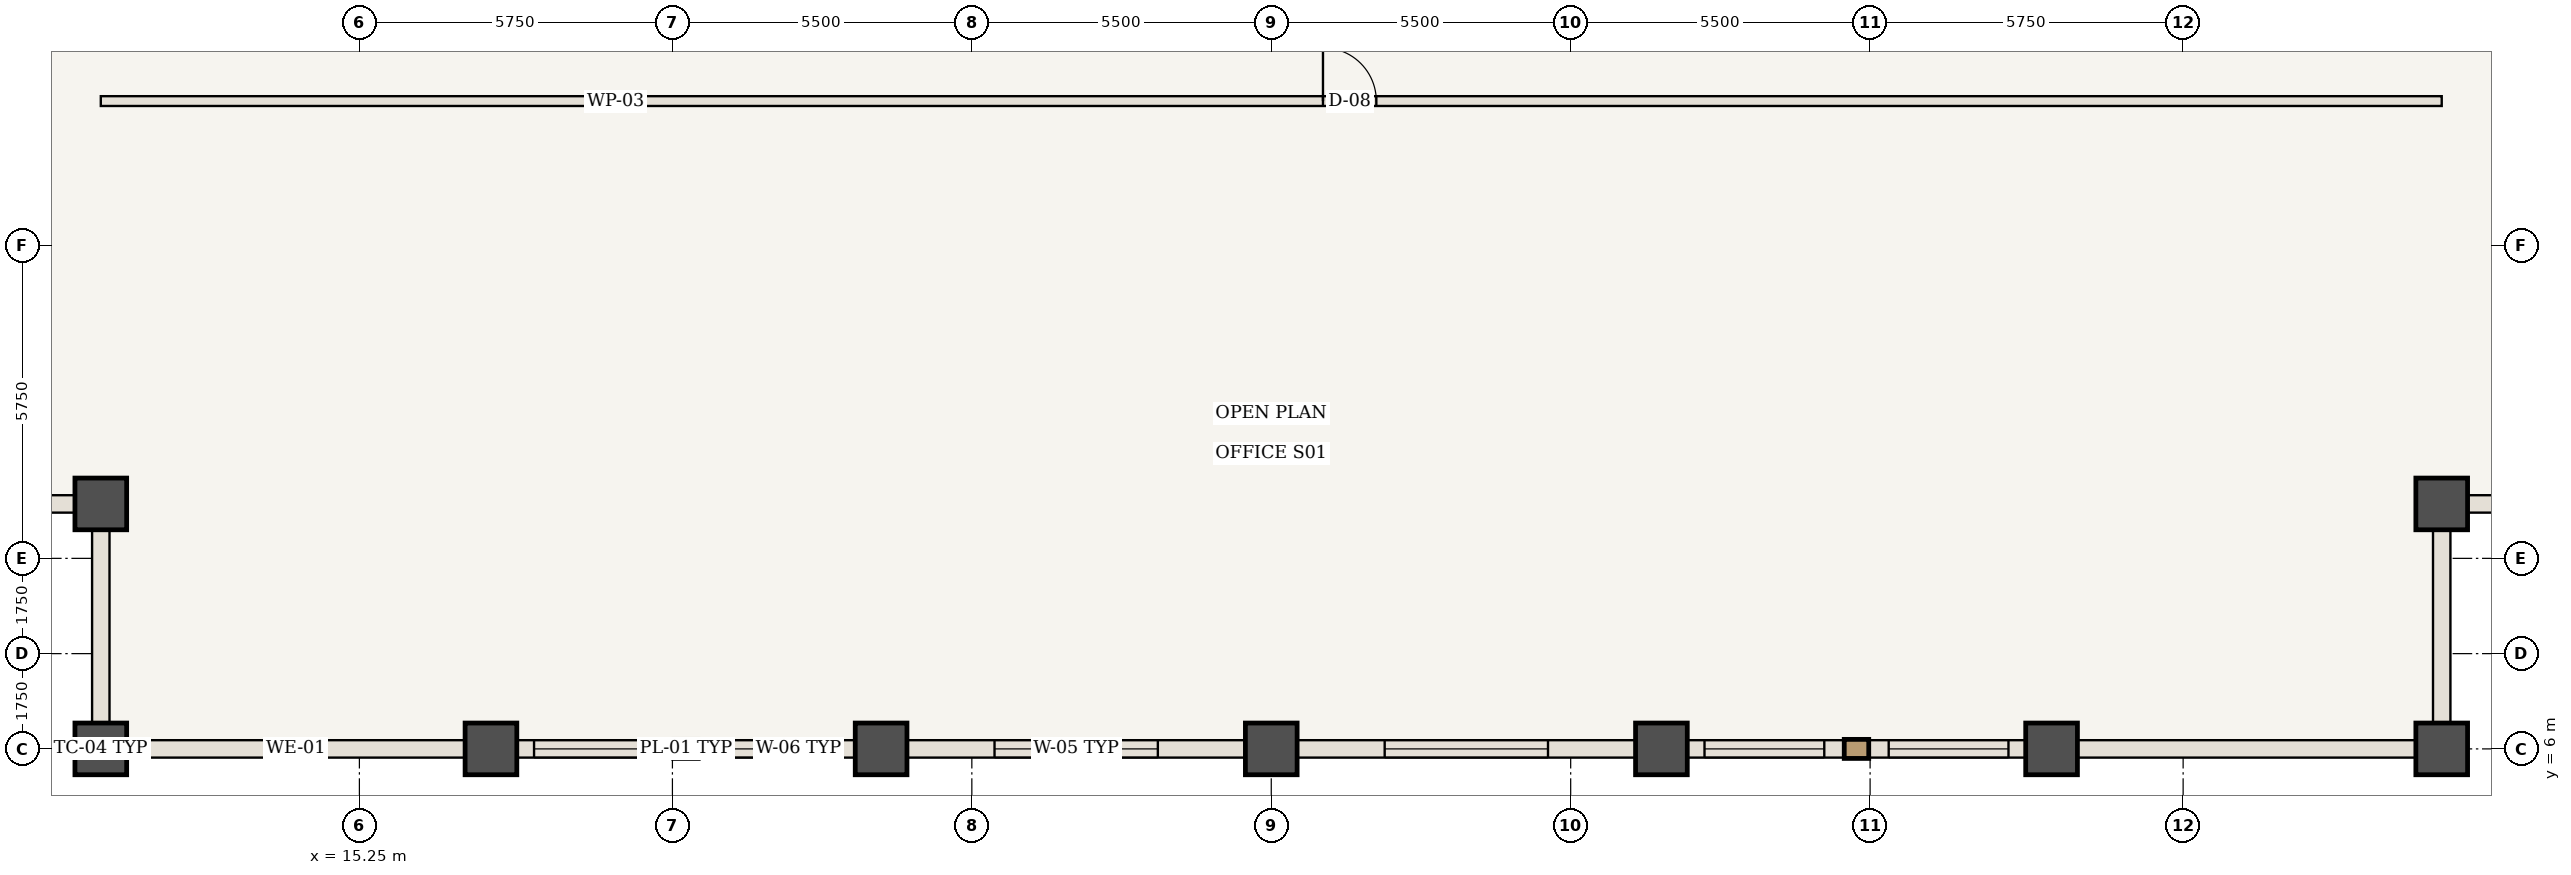
"""IFC4 building model, lengths in metres.
Left out: names, types, materials, properties, quantities, classifications, styles, units other than length and angle.
Written with IfcOpenShell. Run it as: python <this file> out.ifc"""

import sys

from ifc_helpers import new_model, si_unit, direction, frame, frame_2d, origin, origin_2d, place, context, subcontext, project, spatial, rectangle, extrude, element, fill, save


model = new_model("IFC4")
c1 = context("Model", 3, precision=1e-05, world=origin(), true_north=direction((0.0, 1.0)))
c2 = subcontext(c1, "Body", "Model", "MODEL_VIEW")
j1 = project(units=[si_unit("LENGTHUNIT", "METRE"), si_unit("PLANEANGLEUNIT", "RADIAN")], contexts=[c1])
p1 = place(None, origin())
s1 = spatial("IfcSite", under=j1, at=p1, CompositionType="ELEMENT")
p2 = place(p1, origin())
s2 = spatial("IfcBuilding", under=s1, at=p2, CompositionType="ELEMENT")
p3 = place(p2, frame((0.0, 0.0, 145.25)))
s3 = spatial("IfcBuildingStorey", under=s2, at=p3, CompositionType="ELEMENT", Elevation=145.25)
for number, where, z_axis, x_axis in (
    (1, (10.5, 6.0, 0.0), (0.0, 0.0, 1.0), (1.0, 0.0, 0.0)),
    (2, (10.5, 10.5, 0.0), (0.0, 0.0, 1.0), (1.0, 0.0, 0.0)),
    (3, (53.5, 6.0, 0.0), (0.0, 0.0, 1.0), (1.0, 0.0, 0.0)),
    (4, (53.5, 10.5, 0.0), (0.0, 0.0, 1.0), (1.0, 0.0, 0.0)),
    (5, (17.667, 6.0, 0.0), (0.0, 0.0, 1.0), (1.0, 0.0, 0.0)),
    (6, (24.833, 6.0, 0.0), (0.0, 0.0, 1.0), (1.0, 0.0, 0.0)),
    (7, (32.0, 6.0, 0.0), (0.0, 0.0, 1.0), (1.0, 0.0, 0.0)),
    (8, (39.167, 6.0, 0.0), (0.0, 0.0, 1.0), (1.0, 0.0, 0.0)),
    (9, (46.333, 6.0, 0.0), (0.0, 0.0, 1.0), (1.0, 0.0, 0.0)),
):
    element("IfcColumn", number, at=place(p3, frame(where, z_axis=z_axis, x_axis=x_axis)), inside=s3, PredefinedType="COLUMN", context=c2, shape_type="SweptSolid", body=[
        extrude(rectangle(XDim=0.95, YDim=0.95, at=origin_2d()), origin(), (0.0, 0.0, 1.0), 3.85),
    ])
p4 = place(p3, frame((10.5, 17.9, 0.0), z_axis=(0.0, 0.0, 1.0), x_axis=(1.0, 0.0, 0.0)))
e10 = element("IfcWall", 10, at=p4, inside=s3, PredefinedType="STANDARD", context=c2, shape_type="SweptSolid", body=[
    extrude(rectangle(XDim=43.0, YDim=0.18, at=frame_2d((21.5, 0.0))), origin(), (0.0, 0.0, 1.0), 3.685),
])
p5 = place(p4, frame((22.45, 0.0, 0.0)))
e11 = element("IfcOpeningElement", 11, at=p5, cuts=e10, PredefinedType="OPENING", context=c2, shape_type="SweptSolid", body=[
    extrude(rectangle(XDim=0.98, YDim=2.2, at=frame_2d((0.49, 1.1))), frame((0.0, 0.1, 0.0), z_axis=(0.0, -1.0, 0.0), x_axis=(1.0, 0.0, 0.0)), (0.0, 0.0, 1.0), 0.2),
])
p6 = place(p3, frame((17.667, 6.0, 0.0), z_axis=(0.0, 0.0, 1.0), x_axis=(-1.0, 0.0, 0.0)))
e12 = element("IfcWall", 12, at=p6, inside=s3, PredefinedType="USERDEFINED", context=c2, shape_type="SweptSolid", body=[
    extrude(rectangle(XDim=7.167, YDim=0.32, at=frame_2d((3.583, 0.0))), origin(), (0.0, 0.0, 1.0), 2.885),
])
p7 = place(p3, frame((24.833, 6.0, 0.0), z_axis=(0.0, 0.0, 1.0), x_axis=(-1.0, 0.0, 0.0)))
e13 = element("IfcWall", 13, at=p7, inside=s3, PredefinedType="USERDEFINED", context=c2, shape_type="SweptSolid", body=[
    extrude(rectangle(XDim=7.167, YDim=0.32, at=frame_2d((3.583, 0.0))), origin(), (0.0, 0.0, 1.0), 2.885),
])
p8 = place(p7, frame((0.792, 0.0, 0.85)))
e14 = element("IfcOpeningElement", 14, at=p8, cuts=e13, PredefinedType="OPENING", context=c2, shape_type="SweptSolid", body=[
    extrude(rectangle(XDim=2.2, YDim=1.835, at=frame_2d((1.1, 0.917))), frame((0.0, 0.17, 0.0), z_axis=(0.0, -1.0, 0.0), x_axis=(1.0, 0.0, 0.0)), (0.0, 0.0, 1.0), 0.34),
])
p9 = place(p7, frame((4.175, 0.0, 0.85)))
e15 = element("IfcOpeningElement", 15, at=p9, cuts=e13, PredefinedType="OPENING", context=c2, shape_type="SweptSolid", body=[
    extrude(rectangle(XDim=2.2, YDim=1.835, at=frame_2d((1.1, 0.917))), frame((0.0, 0.17, 0.0), z_axis=(0.0, -1.0, 0.0), x_axis=(1.0, 0.0, 0.0)), (0.0, 0.0, 1.0), 0.34),
])
p10 = place(p3, frame((32.0, 6.0, 0.0), z_axis=(0.0, 0.0, 1.0), x_axis=(-1.0, 0.0, 0.0)))
e16 = element("IfcWall", 16, at=p10, inside=s3, PredefinedType="USERDEFINED", context=c2, shape_type="SweptSolid", body=[
    extrude(rectangle(XDim=7.167, YDim=0.32, at=frame_2d((3.583, 0.0))), origin(), (0.0, 0.0, 1.0), 2.885),
])
p11 = place(p10, frame((2.083, 0.0, 0.85)))
e17 = element("IfcOpeningElement", 17, at=p11, cuts=e16, PredefinedType="OPENING", context=c2, shape_type="SweptSolid", body=[
    extrude(rectangle(XDim=3.0, YDim=1.835, at=frame_2d((1.5, 0.917))), frame((0.0, 0.17, 0.0), z_axis=(0.0, -1.0, 0.0), x_axis=(1.0, 0.0, 0.0)), (0.0, 0.0, 1.0), 0.34),
])
p12 = place(p3, frame((39.167, 6.0, 0.0), z_axis=(0.0, 0.0, 1.0), x_axis=(-1.0, 0.0, 0.0)))
e18 = element("IfcWall", 18, at=p12, inside=s3, PredefinedType="USERDEFINED", context=c2, shape_type="SweptSolid", body=[
    extrude(rectangle(XDim=7.167, YDim=0.32, at=frame_2d((3.583, 0.0))), origin(), (0.0, 0.0, 1.0), 2.885),
])
p13 = place(p12, frame((2.083, 0.0, 0.85)))
e19 = element("IfcOpeningElement", 19, at=p13, cuts=e18, PredefinedType="OPENING", context=c2, shape_type="SweptSolid", body=[
    extrude(rectangle(XDim=3.0, YDim=1.835, at=frame_2d((1.5, 0.917))), frame((0.0, 0.17, 0.0), z_axis=(0.0, -1.0, 0.0), x_axis=(1.0, 0.0, 0.0)), (0.0, 0.0, 1.0), 0.34),
])
p14 = place(p3, frame((46.333, 6.0, 0.0), z_axis=(0.0, 0.0, 1.0), x_axis=(-1.0, 0.0, 0.0)))
e20 = element("IfcWall", 20, at=p14, inside=s3, PredefinedType="USERDEFINED", context=c2, shape_type="SweptSolid", body=[
    extrude(rectangle(XDim=7.167, YDim=0.32, at=frame_2d((3.583, 0.0))), origin(), (0.0, 0.0, 1.0), 2.885),
])
p15 = place(p14, frame((0.792, 0.0, 0.85)))
e21 = element("IfcOpeningElement", 21, at=p15, cuts=e20, PredefinedType="OPENING", context=c2, shape_type="SweptSolid", body=[
    extrude(rectangle(XDim=2.2, YDim=1.835, at=frame_2d((1.1, 0.917))), frame((0.0, 0.17, 0.0), z_axis=(0.0, -1.0, 0.0), x_axis=(1.0, 0.0, 0.0)), (0.0, 0.0, 1.0), 0.34),
])
p16 = place(p14, frame((4.175, 0.0, 0.85)))
e22 = element("IfcOpeningElement", 22, at=p16, cuts=e20, PredefinedType="OPENING", context=c2, shape_type="SweptSolid", body=[
    extrude(rectangle(XDim=2.2, YDim=1.835, at=frame_2d((1.1, 0.917))), frame((0.0, 0.17, 0.0), z_axis=(0.0, -1.0, 0.0), x_axis=(1.0, 0.0, 0.0)), (0.0, 0.0, 1.0), 0.34),
])
p17 = place(p3, frame((53.5, 6.0, 0.0), z_axis=(0.0, 0.0, 1.0), x_axis=(-1.0, 0.0, 0.0)))
e23 = element("IfcWall", 23, at=p17, inside=s3, PredefinedType="USERDEFINED", context=c2, shape_type="SweptSolid", body=[
    extrude(rectangle(XDim=7.167, YDim=0.32, at=frame_2d((3.583, 0.0))), origin(), (0.0, 0.0, 1.0), 2.885),
])
for number, where, z_axis, x_axis in (
    (24, (10.5, 6.0, 0.0), (0.0, 0.0, 1.0), (0.0, 1.0, 0.0)),
    (25, (10.5, 10.5, 0.0), (0.0, 0.0, 1.0), (-1.0, 0.0, 0.0)),
    (26, (53.5, 10.5, 0.0), (0.0, 0.0, 1.0), (0.0, -1.0, 0.0)),
    (27, (58.0, 10.5, 0.0), (0.0, 0.0, 1.0), (-1.0, 0.0, 0.0)),
):
    element("IfcWall", number, at=place(p3, frame(where, z_axis=z_axis, x_axis=x_axis)), inside=s3, PredefinedType="USERDEFINED", context=c2, shape_type="SweptSolid", body=[
        extrude(rectangle(XDim=4.5, YDim=0.32, at=frame_2d((2.25, 0.0))), origin(), (0.0, 0.0, 1.0), 2.885),
    ])
p18 = place(p5, origin())
e28 = element("IfcDoor", 28, at=p18, inside=s3, OperationType="SINGLE_SWING_LEFT", PredefinedType="DOOR", context=c2, shape_type="SweptSolid", body=[
    extrude(rectangle(XDim=0.98, YDim=2.2, at=frame_2d((0.49, 1.1))), frame((0.0, 0.025, 0.0), z_axis=(0.0, -1.0, 0.0), x_axis=(1.0, 0.0, 0.0)), (0.0, 0.0, 1.0), 0.05),
])
fill(e11, e28)
p19 = place(p8, origin())
e29 = element("IfcWindow", 29, at=p19, inside=s3, PartitioningType="SINGLE_PANEL", PredefinedType="WINDOW", context=c2, shape_type="SweptSolid", body=[
    extrude(rectangle(XDim=2.2, YDim=1.835, at=frame_2d((1.1, 0.917))), frame((0.0, 0.03, 0.0), z_axis=(0.0, -1.0, 0.0), x_axis=(1.0, 0.0, 0.0)), (0.0, 0.0, 1.0), 0.06),
])
fill(e14, e29)
p20 = place(p9, origin())
e30 = element("IfcWindow", 30, at=p20, inside=s3, PartitioningType="SINGLE_PANEL", PredefinedType="WINDOW", context=c2, shape_type="SweptSolid", body=[
    extrude(rectangle(XDim=2.2, YDim=1.835, at=frame_2d((1.1, 0.917))), frame((0.0, 0.03, 0.0), z_axis=(0.0, -1.0, 0.0), x_axis=(1.0, 0.0, 0.0)), (0.0, 0.0, 1.0), 0.06),
])
fill(e15, e30)
p21 = place(p11, origin())
e31 = element("IfcWindow", 31, at=p21, inside=s3, PartitioningType="SINGLE_PANEL", PredefinedType="WINDOW", context=c2, shape_type="SweptSolid", body=[
    extrude(rectangle(XDim=3.0, YDim=1.835, at=frame_2d((1.5, 0.917))), frame((0.0, 0.03, 0.0), z_axis=(0.0, -1.0, 0.0), x_axis=(1.0, 0.0, 0.0)), (0.0, 0.0, 1.0), 0.06),
])
fill(e17, e31)
p22 = place(p13, origin())
e32 = element("IfcWindow", 32, at=p22, inside=s3, PartitioningType="SINGLE_PANEL", PredefinedType="WINDOW", context=c2, shape_type="SweptSolid", body=[
    extrude(rectangle(XDim=3.0, YDim=1.835, at=frame_2d((1.5, 0.917))), frame((0.0, 0.03, 0.0), z_axis=(0.0, -1.0, 0.0), x_axis=(1.0, 0.0, 0.0)), (0.0, 0.0, 1.0), 0.06),
])
fill(e19, e32)
p23 = place(p15, origin())
e33 = element("IfcWindow", 33, at=p23, inside=s3, PartitioningType="SINGLE_PANEL", PredefinedType="WINDOW", context=c2, shape_type="SweptSolid", body=[
    extrude(rectangle(XDim=2.2, YDim=1.835, at=frame_2d((1.1, 0.917))), frame((0.0, 0.03, 0.0), z_axis=(0.0, -1.0, 0.0), x_axis=(1.0, 0.0, 0.0)), (0.0, 0.0, 1.0), 0.06),
])
fill(e21, e33)
p24 = place(p16, origin())
e34 = element("IfcWindow", 34, at=p24, inside=s3, PartitioningType="SINGLE_PANEL", PredefinedType="WINDOW", context=c2, shape_type="SweptSolid", body=[
    extrude(rectangle(XDim=2.2, YDim=1.835, at=frame_2d((1.1, 0.917))), frame((0.0, 0.03, 0.0), z_axis=(0.0, -1.0, 0.0), x_axis=(1.0, 0.0, 0.0)), (0.0, 0.0, 1.0), 0.06),
])
fill(e22, e34)
save(model, sys.argv[1])
